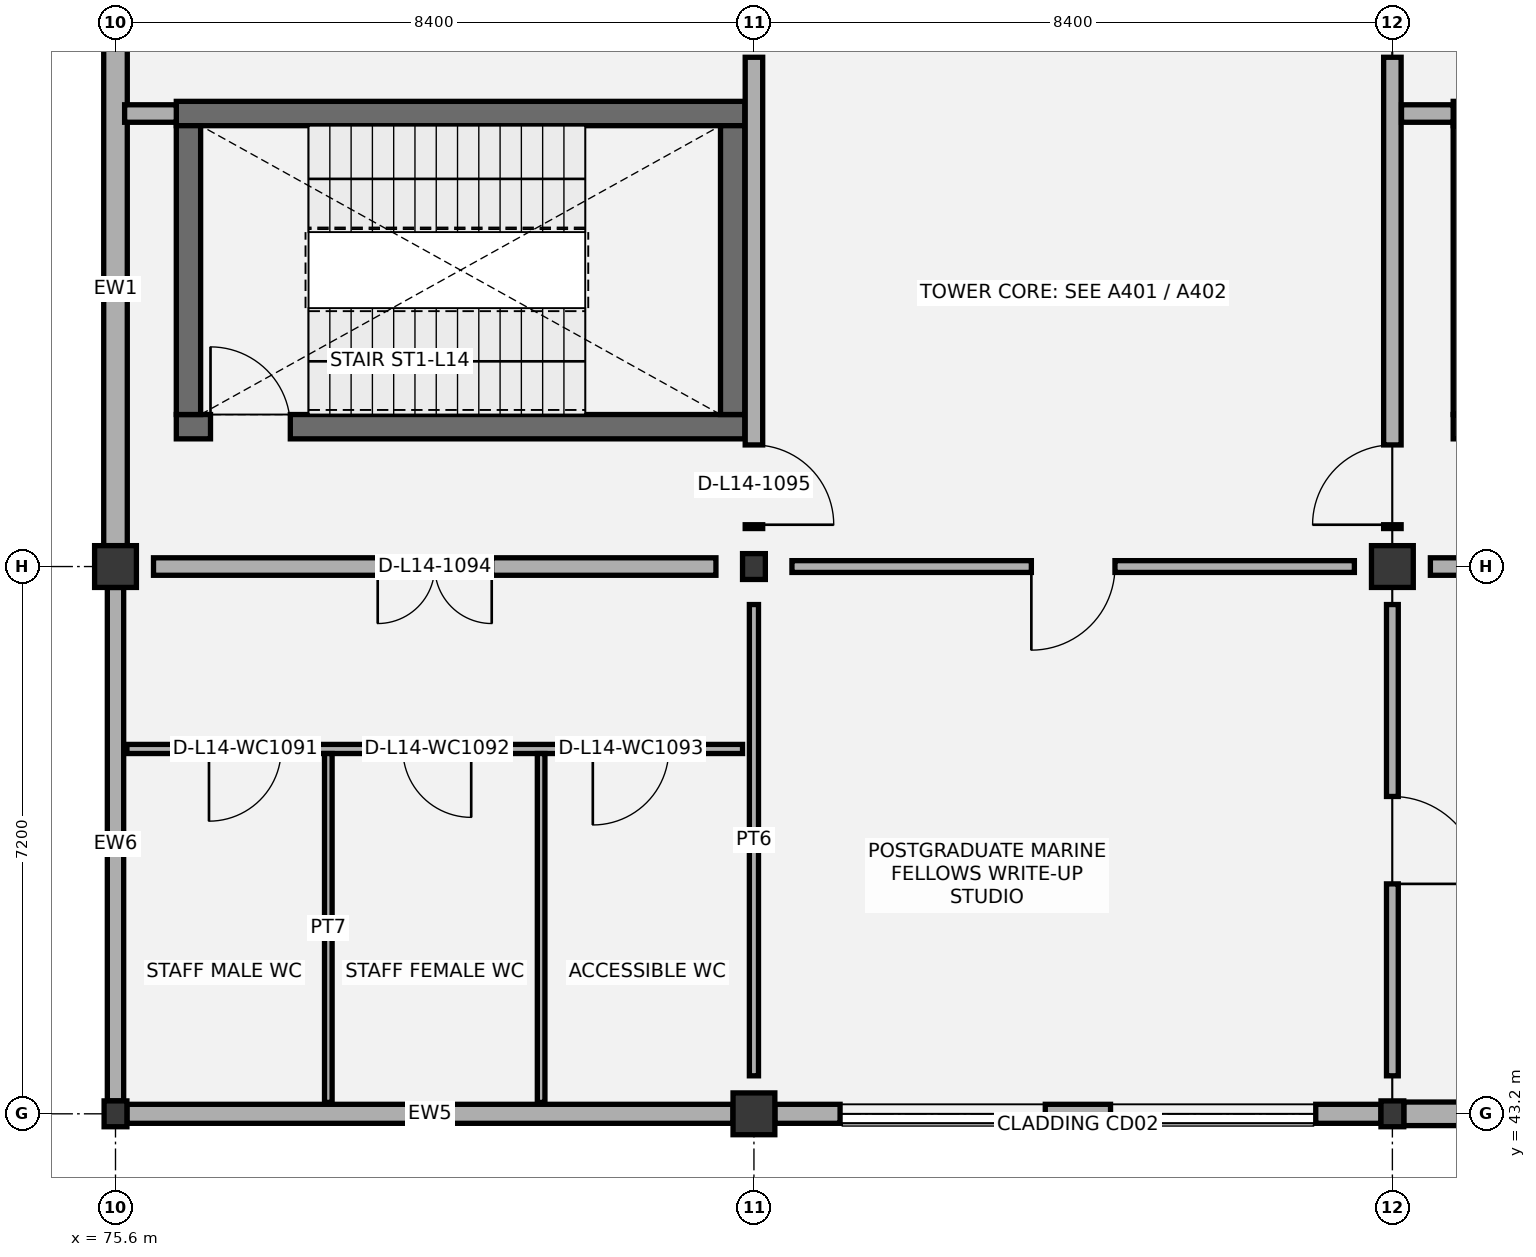
"""IFC4 building model, lengths in metres.
Left out: names, types, materials, properties, quantities, classifications, styles, units other than length and angle.
Written with IfcOpenShell. Run it as: python <this file> out.ifc"""

import sys

from ifc_helpers import new_model, si_unit, direction, frame, frame_2d, origin, origin_2d, place, context, subcontext, project, spatial, rectangle, i_section, extrude, element, fill, save


model = new_model("IFC4")
c1 = context("Model", 3, precision=1e-05, world=origin(), true_north=direction((0.0, 1.0)))
c2 = subcontext(c1, "Body", "Model", "MODEL_VIEW")
j1 = project(units=[si_unit("LENGTHUNIT", "METRE"), si_unit("PLANEANGLEUNIT", "RADIAN")], contexts=[c1])
p1 = place(None, origin())
s1 = spatial("IfcSite", under=j1, at=p1, CompositionType="ELEMENT")
p2 = place(p1, origin())
s2 = spatial("IfcBuilding", under=s1, at=p2, CompositionType="ELEMENT")
p3 = place(p2, frame((0.0, 0.0, 64.8)))
s3 = spatial("IfcBuildingStorey", under=s2, at=p3, CompositionType="ELEMENT", Elevation=64.8)
p4 = place(p3, frame((75.6, 43.2, 0.0), z_axis=(0.0, 0.0, 1.0), x_axis=(1.0, 0.0, 0.0)))
e1 = element("IfcColumn", 1, at=p4, inside=s3, PredefinedType="COLUMN", context=c2, shape_type="SweptSolid", body=[
    extrude(i_section(OverallWidth=0.3, OverallDepth=0.34, WebThickness=0.012, FlangeThickness=0.021, FilletRadius=0.027, at=origin_2d()), origin(), (0.0, 0.0, 1.0), 4.2),
])
for number, where, z_axis, x_axis in (
    (2, (75.6, 50.4, 0.0), (0.0, 0.0, 1.0), (1.0, 0.0, 0.0)),
    (3, (84.0, 43.2, 0.0), (0.0, 0.0, 1.0), (1.0, 0.0, 0.0)),
):
    element("IfcColumn", number, at=place(p3, frame(where, z_axis=z_axis, x_axis=x_axis)), inside=s3, PredefinedType="COLUMN", context=c2, shape_type="SweptSolid", body=[
        extrude(rectangle(XDim=0.55, YDim=0.55, at=origin_2d()), origin(), (0.0, 0.0, 1.0), 4.2),
    ])
for number, where, z_axis, x_axis in (
    (4, (84.0, 50.4, 0.0), (0.0, 0.0, 1.0), (1.0, 0.0, 0.0)),
    (5, (92.4, 43.2, 0.0), (0.0, 0.0, 1.0), (1.0, 0.0, 0.0)),
):
    element("IfcColumn", number, at=place(p3, frame(where, z_axis=z_axis, x_axis=x_axis)), inside=s3, PredefinedType="COLUMN", context=c2, shape_type="SweptSolid", body=[
        extrude(i_section(OverallWidth=0.3, OverallDepth=0.34, WebThickness=0.012, FlangeThickness=0.021, FilletRadius=0.027, at=origin_2d()), origin(), (0.0, 0.0, 1.0), 4.2),
    ])
p5 = place(p3, frame((92.4, 50.4, 0.0), z_axis=(0.0, 0.0, 1.0), x_axis=(1.0, 0.0, 0.0)))
e6 = element("IfcColumn", 6, at=p5, inside=s3, PredefinedType="COLUMN", context=c2, shape_type="SweptSolid", body=[
    extrude(rectangle(XDim=0.55, YDim=0.55, at=origin_2d()), origin(), (0.0, 0.0, 1.0), 4.2),
])
p6 = place(p3, frame((76.4, 52.24, 0.0), z_axis=(0.0, 0.0, 1.0), x_axis=(1.0, 0.0, 0.0)))
e7 = element("IfcWall", 7, at=p6, inside=s3, PredefinedType="SHEAR", context=c2, shape_type="SweptSolid", body=[
    extrude(rectangle(XDim=7.48, YDim=0.32, at=frame_2d((3.74, 0.0))), origin(), (0.0, 0.0, 1.0), 3.9),
])
p7 = place(p6, frame((0.45, 0.0, 0.0)))
e8 = element("IfcOpeningElement", 8, at=p7, cuts=e7, PredefinedType="OPENING", context=c2, shape_type="SweptSolid", body=[
    extrude(rectangle(XDim=1.05, YDim=2.15, at=frame_2d((0.525, 1.075))), frame((0.0, 0.17, 0.0), z_axis=(0.0, -1.0, 0.0), x_axis=(1.0, 0.0, 0.0)), (0.0, 0.0, 1.0), 0.34),
])
p8 = place(p3, frame((76.4, 56.36, 0.0), z_axis=(0.0, 0.0, 1.0), x_axis=(1.0, 0.0, 0.0)))
e9 = element("IfcWall", 9, at=p8, inside=s3, PredefinedType="SHEAR", context=c2, shape_type="SweptSolid", body=[
    extrude(rectangle(XDim=7.48, YDim=0.32, at=frame_2d((3.74, 0.0))), origin(), (0.0, 0.0, 1.0), 3.9),
])
for number, where, z_axis, x_axis in (
    (10, (76.56, 52.4, 0.0), (0.0, 0.0, 1.0), (0.0, 1.0, 0.0)),
    (11, (83.72, 52.4, 0.0), (0.0, 0.0, 1.0), (0.0, 1.0, 0.0)),
):
    element("IfcWall", number, at=place(p3, frame(where, z_axis=z_axis, x_axis=x_axis)), inside=s3, PredefinedType="SHEAR", context=c2, shape_type="SweptSolid", body=[
        extrude(rectangle(XDim=3.8, YDim=0.32, at=frame_2d((1.9, 0.0))), origin(), (0.0, 0.0, 1.0), 3.9),
    ])
p9 = place(p3, frame((93.2, 52.24, 0.0), z_axis=(0.0, 0.0, 1.0), x_axis=(1.0, 0.0, 0.0)))
e12 = element("IfcWall", 12, at=p9, inside=s3, PredefinedType="SHEAR", context=c2, shape_type="SweptSolid", body=[
    extrude(rectangle(XDim=7.48, YDim=0.32, at=frame_2d((3.74, 0.0))), origin(), (0.0, 0.0, 1.0), 3.9),
])
p10 = place(p9, frame((0.45, 0.0, 0.0)))
e13 = element("IfcOpeningElement", 13, at=p10, cuts=e12, PredefinedType="OPENING", context=c2, shape_type="SweptSolid", body=[
    extrude(rectangle(XDim=1.05, YDim=2.15, at=frame_2d((0.525, 1.075))), frame((0.0, 0.17, 0.0), z_axis=(0.0, -1.0, 0.0), x_axis=(1.0, 0.0, 0.0)), (0.0, 0.0, 1.0), 0.34),
])
p11 = place(p3, frame((93.2, 56.36, 0.0), z_axis=(0.0, 0.0, 1.0), x_axis=(1.0, 0.0, 0.0)))
e14 = element("IfcWall", 14, at=p11, inside=s3, PredefinedType="SHEAR", context=c2, shape_type="SweptSolid", body=[
    extrude(rectangle(XDim=7.48, YDim=0.32, at=frame_2d((3.74, 0.0))), origin(), (0.0, 0.0, 1.0), 3.9),
])
p12 = place(p3, frame((93.36, 52.4, 0.0), z_axis=(0.0, 0.0, 1.0), x_axis=(0.0, 1.0, 0.0)))
e15 = element("IfcWall", 15, at=p12, inside=s3, PredefinedType="SHEAR", context=c2, shape_type="SweptSolid", body=[
    extrude(rectangle(XDim=3.8, YDim=0.32, at=frame_2d((1.9, 0.0))), origin(), (0.0, 0.0, 1.0), 3.9),
])
p13 = place(p3, frame((75.75, 43.2, 0.0), z_axis=(0.0, 0.0, 1.0), x_axis=(1.0, 0.0, 0.0)))
e16 = element("IfcWall", 16, at=p13, inside=s3, PredefinedType="SOLIDWALL", context=c2, shape_type="SweptSolid", body=[
    extrude(rectangle(XDim=7.975, YDim=0.25, at=frame_2d((3.988, 0.0))), origin(), (0.0, 0.0, 1.0), 3.345),
])
p14 = place(p3, frame((75.6, 43.37, 0.0), z_axis=(0.0, 0.0, 1.0), x_axis=(0.0, 1.0, 0.0)))
e17 = element("IfcWall", 17, at=p14, inside=s3, PredefinedType="SOLIDWALL", context=c2, shape_type="SweptSolid", body=[
    extrude(rectangle(XDim=6.755, YDim=0.215, at=frame_2d((3.377, 0.0))), origin(), (0.0, 0.0, 1.0), 3.345),
])
p15 = place(p3, frame((75.6, 50.675, 0.0), z_axis=(0.0, 0.0, 1.0), x_axis=(0.0, 1.0, 0.0)))
e18 = element("IfcWall", 18, at=p15, inside=s3, PredefinedType="SOLIDWALL", context=c2, shape_type="SweptSolid", body=[
    extrude(rectangle(XDim=6.755, YDim=0.31, at=frame_2d((3.377, 0.0))), origin(), (0.0, 0.0, 1.0), 3.345),
])
p16 = place(p3, frame((84.275, 43.2, 0.0), z_axis=(0.0, 0.0, 1.0), x_axis=(1.0, 0.0, 0.0)))
e19 = element("IfcWall", 19, at=p16, inside=s3, PredefinedType="SOLIDWALL", context=c2, shape_type="SweptSolid", body=[
    extrude(rectangle(XDim=7.975, YDim=0.25, at=frame_2d((3.988, 0.0))), origin(), (0.0, 0.0, 1.0), 3.345),
])
p17 = place(p16, frame((0.858, 0.0, 0.95)))
e20 = element("IfcOpeningElement", 20, at=p17, cuts=e19, PredefinedType="OPENING", context=c2, shape_type="SweptSolid", body=[
    extrude(rectangle(XDim=2.7, YDim=1.65, at=frame_2d((1.35, 0.825))), frame((0.0, 0.135, 0.0), z_axis=(0.0, -1.0, 0.0), x_axis=(1.0, 0.0, 0.0)), (0.0, 0.0, 1.0), 0.27),
])
p18 = place(p16, frame((4.417, 0.0, 0.95)))
e21 = element("IfcOpeningElement", 21, at=p18, cuts=e19, PredefinedType="OPENING", context=c2, shape_type="SweptSolid", body=[
    extrude(rectangle(XDim=2.7, YDim=1.65, at=frame_2d((1.35, 0.825))), frame((0.0, 0.135, 0.0), z_axis=(0.0, -1.0, 0.0), x_axis=(1.0, 0.0, 0.0)), (0.0, 0.0, 1.0), 0.27),
])
p19 = place(p3, frame((92.55, 43.2, 0.0), z_axis=(0.0, 0.0, 1.0), x_axis=(1.0, 0.0, 0.0)))
e22 = element("IfcWall", 22, at=p19, inside=s3, PredefinedType="SOLIDWALL", context=c2, shape_type="SweptSolid", body=[
    extrude(rectangle(XDim=7.975, YDim=0.31, at=frame_2d((3.987, 0.0))), origin(), (0.0, 0.0, 1.0), 3.345),
])
p20 = place(p19, frame((1.658, 0.0, 0.95)))
e23 = element("IfcOpeningElement", 23, at=p20, cuts=e22, PredefinedType="OPENING", context=c2, shape_type="SweptSolid", body=[
    extrude(rectangle(XDim=1.5, YDim=1.5, at=frame_2d((0.75, 0.75))), frame((0.0, 0.165, 0.0), z_axis=(0.0, -1.0, 0.0), x_axis=(1.0, 0.0, 0.0)), (0.0, 0.0, 1.0), 0.33),
])
p21 = place(p19, frame((4.817, 0.0, 0.95)))
e24 = element("IfcOpeningElement", 24, at=p21, cuts=e22, PredefinedType="OPENING", context=c2, shape_type="SweptSolid", body=[
    extrude(rectangle(XDim=1.5, YDim=1.5, at=frame_2d((0.75, 0.75))), frame((0.0, 0.165, 0.0), z_axis=(0.0, -1.0, 0.0), x_axis=(1.0, 0.0, 0.0)), (0.0, 0.0, 1.0), 0.33),
])
p22 = place(p3, frame((75.75, 48.0, 0.0), z_axis=(0.0, 0.0, 1.0), x_axis=(1.0, 0.0, 0.0)))
e25 = element("IfcWall", 25, at=p22, inside=s3, PredefinedType="PARTITIONING", context=c2, shape_type="SweptSolid", body=[
    extrude(rectangle(XDim=8.1, YDim=0.12, at=frame_2d((4.05, 0.0))), origin(), (0.0, 0.0, 1.0), 3.9),
])
p23 = place(p22, frame((1.08, 0.0, 0.0)))
e26 = element("IfcOpeningElement", 26, at=p23, cuts=e25, PredefinedType="OPENING", context=c2, shape_type="SweptSolid", body=[
    extrude(rectangle(XDim=0.95, YDim=2.1, at=frame_2d((0.475, 1.05))), frame((0.0, 0.07, 0.0), z_axis=(0.0, -1.0, 0.0), x_axis=(1.0, 0.0, 0.0)), (0.0, 0.0, 1.0), 0.14),
])
p24 = place(p22, frame((3.63, 0.0, 0.0)))
e27 = element("IfcOpeningElement", 27, at=p24, cuts=e25, PredefinedType="OPENING", context=c2, shape_type="SweptSolid", body=[
    extrude(rectangle(XDim=0.9, YDim=2.1, at=frame_2d((0.45, 1.05))), frame((0.0, 0.07, 0.0), z_axis=(0.0, -1.0, 0.0), x_axis=(1.0, 0.0, 0.0)), (0.0, 0.0, 1.0), 0.14),
])
p25 = place(p22, frame((6.13, 0.0, 0.0)))
e28 = element("IfcOpeningElement", 28, at=p25, cuts=e25, PredefinedType="OPENING", context=c2, shape_type="SweptSolid", body=[
    extrude(rectangle(XDim=1.0, YDim=2.1, at=frame_2d((0.5, 1.05))), frame((0.0, 0.07, 0.0), z_axis=(0.0, -1.0, 0.0), x_axis=(1.0, 0.0, 0.0)), (0.0, 0.0, 1.0), 0.14),
])
for number, where, z_axis, x_axis in (
    (29, (78.4, 43.35, 0.0), (0.0, 0.0, 1.0), (0.0, 1.0, 0.0)),
    (30, (81.2, 43.35, 0.0), (0.0, 0.0, 1.0), (0.0, 1.0, 0.0)),
):
    element("IfcWall", number, at=place(p3, frame(where, z_axis=z_axis, x_axis=x_axis)), inside=s3, PredefinedType="PARTITIONING", context=c2, shape_type="SweptSolid", body=[
        extrude(rectangle(XDim=4.59, YDim=0.1, at=frame_2d((2.295, 0.0))), origin(), (0.0, 0.0, 1.0), 3.9),
    ])
p26 = place(p3, frame((84.0, 43.7, 0.0), z_axis=(0.0, 0.0, 1.0), x_axis=(0.0, 1.0, 0.0)))
e31 = element("IfcWall", 31, at=p26, inside=s3, PredefinedType="PARTITIONING", context=c2, shape_type="SweptSolid", body=[
    extrude(rectangle(XDim=6.2, YDim=0.12, at=frame_2d((3.1, 0.0))), origin(), (0.0, 0.0, 1.0), 3.495),
])
p27 = place(p3, frame((76.1, 50.4, 0.0), z_axis=(0.0, 0.0, 1.0), x_axis=(1.0, 0.0, 0.0)))
e32 = element("IfcWall", 32, at=p27, inside=s3, PredefinedType="PARTITIONING", context=c2, shape_type="SweptSolid", body=[
    extrude(rectangle(XDim=7.4, YDim=0.23, at=frame_2d((3.7, 0.0))), origin(), (0.0, 0.0, 1.0), 3.395),
])
p28 = place(p27, frame((2.95, 0.0, 0.0)))
e33 = element("IfcOpeningElement", 33, at=p28, cuts=e32, PredefinedType="OPENING", context=c2, shape_type="SweptSolid", body=[
    extrude(rectangle(XDim=1.5, YDim=2.15, at=frame_2d((0.75, 1.075))), frame((0.0, 0.125, 0.0), z_axis=(0.0, -1.0, 0.0), x_axis=(1.0, 0.0, 0.0)), (0.0, 0.0, 1.0), 0.25),
])
p29 = place(p3, frame((84.0, 50.9, 0.0), z_axis=(0.0, 0.0, 1.0), x_axis=(0.0, 1.0, 0.0)))
e34 = element("IfcWall", 34, at=p29, inside=s3, PredefinedType="PARTITIONING", context=c2, shape_type="SweptSolid", body=[
    extrude(rectangle(XDim=6.2, YDim=0.23, at=frame_2d((3.1, 0.0))), origin(), (0.0, 0.0, 1.0), 3.395),
])
p30 = place(p29, frame((0.05, 0.0, 0.0)))
e35 = element("IfcOpeningElement", 35, at=p30, cuts=e34, PredefinedType="OPENING", context=c2, shape_type="SweptSolid", body=[
    extrude(rectangle(XDim=1.05, YDim=2.15, at=frame_2d((0.525, 1.075))), frame((0.0, 0.125, 0.0), z_axis=(0.0, -1.0, 0.0), x_axis=(1.0, 0.0, 0.0)), (0.0, 0.0, 1.0), 0.25),
])
p31 = place(p3, frame((75.72, 56.36, 0.0), z_axis=(0.0, 0.0, 1.0), x_axis=(1.0, 0.0, 0.0)))
e36 = element("IfcWall", 36, at=p31, inside=s3, PredefinedType="PARTITIONING", context=c2, shape_type="SweptSolid", body=[
    extrude(rectangle(XDim=0.68, YDim=0.23, at=frame_2d((0.34, 0.0))), origin(), (0.0, 0.0, 1.0), 3.9),
])
p32 = place(p3, frame((92.4, 43.7, 0.0), z_axis=(0.0, 0.0, 1.0), x_axis=(0.0, 1.0, 0.0)))
e37 = element("IfcWall", 37, at=p32, inside=s3, PredefinedType="PARTITIONING", context=c2, shape_type="SweptSolid", body=[
    extrude(rectangle(XDim=6.2, YDim=0.155, at=frame_2d((3.1, 0.0))), origin(), (0.0, 0.0, 1.0), 3.395),
])
p33 = place(p32, frame((2.525, 0.0, 0.0)))
e38 = element("IfcOpeningElement", 38, at=p33, cuts=e37, PredefinedType="OPENING", context=c2, shape_type="SweptSolid", body=[
    extrude(rectangle(XDim=1.15, YDim=2.1, at=frame_2d((0.575, 1.05))), frame((0.0, 0.087, 0.0), z_axis=(0.0, -1.0, 0.0), x_axis=(1.0, 0.0, 0.0)), (0.0, 0.0, 1.0), 0.175),
])
p34 = place(p3, frame((84.5, 50.4, 0.0), z_axis=(0.0, 0.0, 1.0), x_axis=(1.0, 0.0, 0.0)))
e39 = element("IfcWall", 39, at=p34, inside=s3, PredefinedType="PARTITIONING", context=c2, shape_type="SweptSolid", body=[
    extrude(rectangle(XDim=7.4, YDim=0.155, at=frame_2d((3.7, 0.0))), origin(), (0.0, 0.0, 1.0), 3.395),
])
p35 = place(p34, frame((3.15, 0.0, 0.0)))
e40 = element("IfcOpeningElement", 40, at=p35, cuts=e39, PredefinedType="OPENING", context=c2, shape_type="SweptSolid", body=[
    extrude(rectangle(XDim=1.1, YDim=2.1, at=frame_2d((0.55, 1.05))), frame((0.0, 0.087, 0.0), z_axis=(0.0, -1.0, 0.0), x_axis=(1.0, 0.0, 0.0)), (0.0, 0.0, 1.0), 0.175),
])
p36 = place(p3, frame((92.4, 50.9, 0.0), z_axis=(0.0, 0.0, 1.0), x_axis=(0.0, 1.0, 0.0)))
e41 = element("IfcWall", 41, at=p36, inside=s3, PredefinedType="PARTITIONING", context=c2, shape_type="SweptSolid", body=[
    extrude(rectangle(XDim=6.2, YDim=0.23, at=frame_2d((3.1, 0.0))), origin(), (0.0, 0.0, 1.0), 3.605),
])
p37 = place(p36, frame((0.05, 0.0, 0.0)))
e42 = element("IfcOpeningElement", 42, at=p37, cuts=e41, PredefinedType="OPENING", context=c2, shape_type="SweptSolid", body=[
    extrude(rectangle(XDim=1.05, YDim=2.15, at=frame_2d((0.525, 1.075))), frame((0.0, 0.125, 0.0), z_axis=(0.0, -1.0, 0.0), x_axis=(1.0, 0.0, 0.0)), (0.0, 0.0, 1.0), 0.25),
])
p38 = place(p3, frame((92.9, 50.4, 0.0), z_axis=(0.0, 0.0, 1.0), x_axis=(1.0, 0.0, 0.0)))
e43 = element("IfcWall", 43, at=p38, inside=s3, PredefinedType="PARTITIONING", context=c2, shape_type="SweptSolid", body=[
    extrude(rectangle(XDim=7.4, YDim=0.23, at=frame_2d((3.7, 0.0))), origin(), (0.0, 0.0, 1.0), 3.395),
])
p39 = place(p38, frame((2.95, 0.0, 0.0)))
e44 = element("IfcOpeningElement", 44, at=p39, cuts=e43, PredefinedType="OPENING", context=c2, shape_type="SweptSolid", body=[
    extrude(rectangle(XDim=1.5, YDim=2.15, at=frame_2d((0.75, 1.075))), frame((0.0, 0.125, 0.0), z_axis=(0.0, -1.0, 0.0), x_axis=(1.0, 0.0, 0.0)), (0.0, 0.0, 1.0), 0.25),
])
p40 = place(p3, frame((92.52, 56.36, 0.0), z_axis=(0.0, 0.0, 1.0), x_axis=(1.0, 0.0, 0.0)))
e45 = element("IfcWall", 45, at=p40, inside=s3, PredefinedType="PARTITIONING", context=c2, shape_type="SweptSolid", body=[
    extrude(rectangle(XDim=0.68, YDim=0.23, at=frame_2d((0.34, 0.0))), origin(), (0.0, 0.0, 1.0), 3.9),
])
p41 = place(p17, origin())
e46 = element("IfcWindow", 46, at=p41, inside=s3, PartitioningType="SINGLE_PANEL", PredefinedType="WINDOW", context=c2, shape_type="SweptSolid", body=[
    extrude(rectangle(XDim=2.7, YDim=1.65, at=frame_2d((1.35, 0.825))), frame((0.0, 0.03, 0.0), z_axis=(0.0, -1.0, 0.0), x_axis=(1.0, 0.0, 0.0)), (0.0, 0.0, 1.0), 0.06),
])
fill(e20, e46)
p42 = place(p18, origin())
e47 = element("IfcWindow", 47, at=p42, inside=s3, PartitioningType="SINGLE_PANEL", PredefinedType="WINDOW", context=c2, shape_type="SweptSolid", body=[
    extrude(rectangle(XDim=2.7, YDim=1.65, at=frame_2d((1.35, 0.825))), frame((0.0, 0.03, 0.0), z_axis=(0.0, -1.0, 0.0), x_axis=(1.0, 0.0, 0.0)), (0.0, 0.0, 1.0), 0.06),
])
fill(e21, e47)
p43 = place(p7, origin())
e48 = element("IfcDoor", 48, at=p43, inside=s3, OperationType="SINGLE_SWING_LEFT", PredefinedType="DOOR", context=c2, shape_type="SweptSolid", body=[
    extrude(rectangle(XDim=1.05, YDim=2.15, at=frame_2d((0.525, 1.075))), frame((0.0, 0.025, 0.0), z_axis=(0.0, -1.0, 0.0), x_axis=(1.0, 0.0, 0.0)), (0.0, 0.0, 1.0), 0.05),
])
fill(e8, e48)
p44 = place(p23, frame((0.95, 0.0, 0.0), z_axis=(0.0, 0.0, 1.0), x_axis=(-1.0, 0.0, 0.0)))
e49 = element("IfcDoor", 49, at=p44, inside=s3, OperationType="SINGLE_SWING_RIGHT", PredefinedType="DOOR", context=c2, shape_type="SweptSolid", body=[
    extrude(rectangle(XDim=0.95, YDim=2.1, at=frame_2d((0.475, 1.05))), frame((0.0, 0.025, 0.0), z_axis=(0.0, -1.0, 0.0), x_axis=(1.0, 0.0, 0.0)), (0.0, 0.0, 1.0), 0.05),
])
fill(e26, e49)
p45 = place(p24, frame((0.9, 0.0, 0.0), z_axis=(0.0, 0.0, 1.0), x_axis=(-1.0, 0.0, 0.0)))
e50 = element("IfcDoor", 50, at=p45, inside=s3, OperationType="SINGLE_SWING_LEFT", PredefinedType="DOOR", context=c2, shape_type="SweptSolid", body=[
    extrude(rectangle(XDim=0.9, YDim=2.1, at=frame_2d((0.45, 1.05))), frame((0.0, 0.025, 0.0), z_axis=(0.0, -1.0, 0.0), x_axis=(1.0, 0.0, 0.0)), (0.0, 0.0, 1.0), 0.05),
])
fill(e27, e50)
p46 = place(p25, frame((1.0, 0.0, 0.0), z_axis=(0.0, 0.0, 1.0), x_axis=(-1.0, 0.0, 0.0)))
e51 = element("IfcDoor", 51, at=p46, inside=s3, OperationType="SINGLE_SWING_RIGHT", PredefinedType="DOOR", context=c2, shape_type="SweptSolid", body=[
    extrude(rectangle(XDim=1.0, YDim=2.1, at=frame_2d((0.5, 1.05))), frame((0.0, 0.025, 0.0), z_axis=(0.0, -1.0, 0.0), x_axis=(1.0, 0.0, 0.0)), (0.0, 0.0, 1.0), 0.05),
])
fill(e28, e51)
p47 = place(p28, frame((1.5, 0.0, 0.0), z_axis=(0.0, 0.0, 1.0), x_axis=(-1.0, 0.0, 0.0)))
e52 = element("IfcDoor", 52, at=p47, inside=s3, OperationType="DOUBLE_DOOR_SINGLE_SWING", PredefinedType="DOOR", context=c2, shape_type="SweptSolid", body=[
    extrude(rectangle(XDim=1.5, YDim=2.15, at=frame_2d((0.75, 1.075))), frame((0.0, 0.025, 0.0), z_axis=(0.0, -1.0, 0.0), x_axis=(1.0, 0.0, 0.0)), (0.0, 0.0, 1.0), 0.05),
])
fill(e33, e52)
p48 = place(p30, frame((1.05, 0.0, 0.0), z_axis=(0.0, 0.0, 1.0), x_axis=(-1.0, 0.0, 0.0)))
e53 = element("IfcDoor", 53, at=p48, inside=s3, OperationType="SINGLE_SWING_RIGHT", PredefinedType="DOOR", context=c2, shape_type="SweptSolid", body=[
    extrude(rectangle(XDim=1.05, YDim=2.15, at=frame_2d((0.525, 1.075))), frame((0.0, 0.025, 0.0), z_axis=(0.0, -1.0, 0.0), x_axis=(1.0, 0.0, 0.0)), (0.0, 0.0, 1.0), 0.05),
])
fill(e35, e53)
p49 = place(p33, frame((1.15, 0.0, 0.0), z_axis=(0.0, 0.0, 1.0), x_axis=(-1.0, 0.0, 0.0)))
e54 = element("IfcDoor", 54, at=p49, inside=s3, OperationType="SINGLE_SWING_RIGHT", PredefinedType="DOOR", context=c2, shape_type="SweptSolid", body=[
    extrude(rectangle(XDim=1.15, YDim=2.1, at=frame_2d((0.575, 1.05))), frame((0.0, 0.025, 0.0), z_axis=(0.0, -1.0, 0.0), x_axis=(1.0, 0.0, 0.0)), (0.0, 0.0, 1.0), 0.05),
])
fill(e38, e54)
p50 = place(p35, frame((1.1, 0.0, 0.0), z_axis=(0.0, 0.0, 1.0), x_axis=(-1.0, 0.0, 0.0)))
e55 = element("IfcDoor", 55, at=p50, inside=s3, OperationType="SINGLE_SWING_RIGHT", PredefinedType="DOOR", context=c2, shape_type="SweptSolid", body=[
    extrude(rectangle(XDim=1.1, YDim=2.1, at=frame_2d((0.55, 1.05))), frame((0.0, 0.025, 0.0), z_axis=(0.0, -1.0, 0.0), x_axis=(1.0, 0.0, 0.0)), (0.0, 0.0, 1.0), 0.05),
])
fill(e40, e55)
p51 = place(p37, origin())
e56 = element("IfcDoor", 56, at=p51, inside=s3, OperationType="SINGLE_SWING_LEFT", PredefinedType="DOOR", context=c2, shape_type="SweptSolid", body=[
    extrude(rectangle(XDim=1.05, YDim=2.15, at=frame_2d((0.525, 1.075))), frame((0.0, 0.025, 0.0), z_axis=(0.0, -1.0, 0.0), x_axis=(1.0, 0.0, 0.0)), (0.0, 0.0, 1.0), 0.05),
])
fill(e42, e56)
save(model, sys.argv[1])
